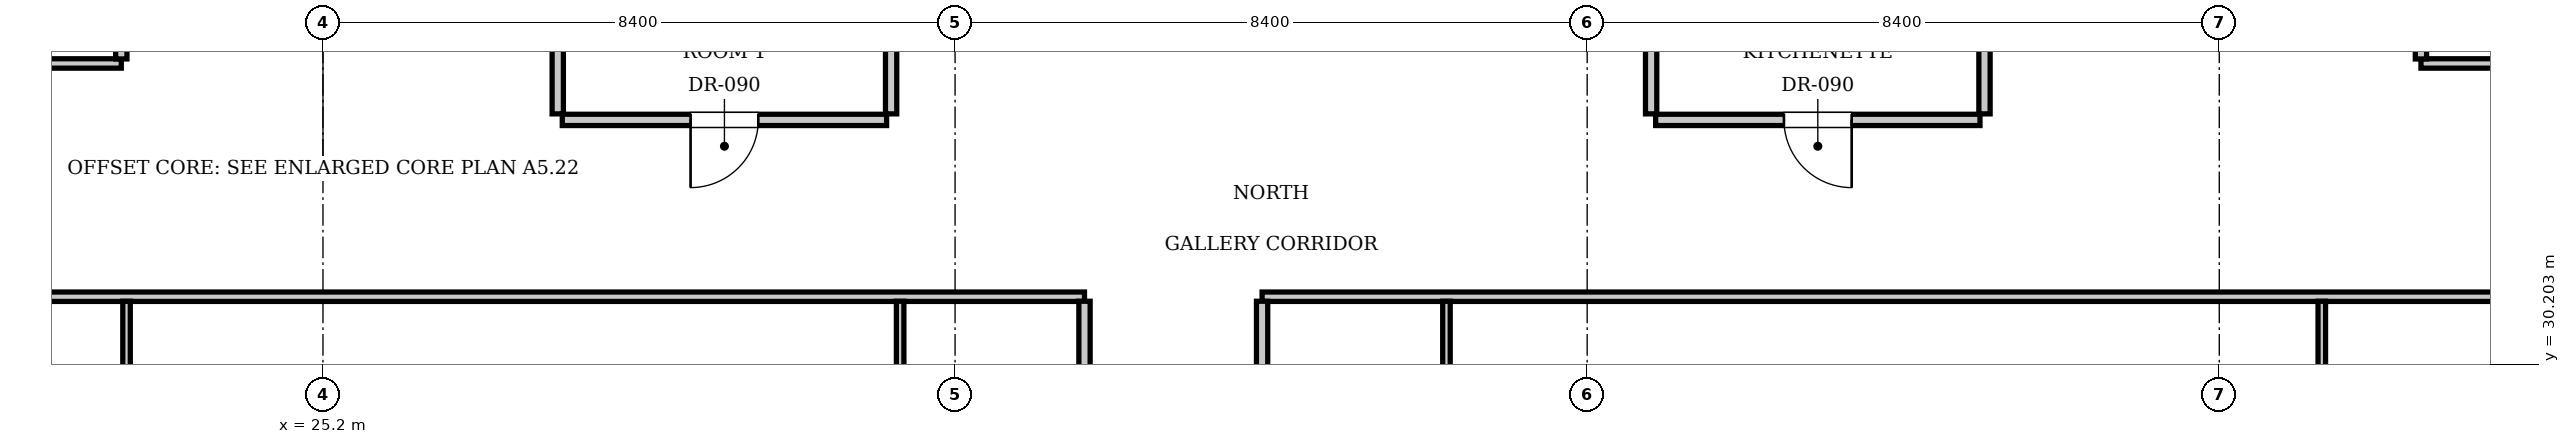
"""IFC4 building model, lengths in metres.
Left out: names, types, materials, properties, quantities, classifications, styles, units other than length and angle.
Written with IfcOpenShell. Run it as: python <this file> out.ifc"""

import sys

from ifc_helpers import new_model, si_unit, direction, frame, frame_2d, origin, place, context, subcontext, project, spatial, rectangle, extrude, element, fill, save


model = new_model("IFC4")
c1 = context("Model", 3, precision=1e-05, world=origin(), true_north=direction((0.0, 1.0)))
c2 = subcontext(c1, "Body", "Model", "MODEL_VIEW")
j1 = project(units=[si_unit("LENGTHUNIT", "METRE"), si_unit("PLANEANGLEUNIT", "RADIAN")], contexts=[c1])
p1 = place(None, origin())
s1 = spatial("IfcSite", under=j1, at=p1, CompositionType="ELEMENT")
p2 = place(p1, origin())
s2 = spatial("IfcBuilding", under=s1, at=p2, CompositionType="ELEMENT")
p3 = place(p2, frame((0.0, 0.0, 146.65)))
s3 = spatial("IfcBuildingStorey", under=s2, at=p3, CompositionType="ELEMENT", Elevation=146.65)
for number, where, z_axis, x_axis in (
    (1, (28.32, 33.53, 0.0), (0.0, 0.0, 1.0), (0.0, 1.0, 0.0)),
    (2, (32.75, 33.53, 0.0), (0.0, 0.0, 1.0), (0.0, 1.0, 0.0)),
):
    element("IfcWall", number, at=place(p3, frame(where, z_axis=z_axis, x_axis=x_axis)), inside=s3, PredefinedType="PARTITIONING", context=c2, shape_type="SweptSolid", body=[
        extrude(rectangle(XDim=2.59, YDim=0.15, at=frame_2d((1.295, 0.0))), origin(), (0.0, 0.0, 1.0), 3.61),
    ])
p4 = place(p3, frame((28.38, 33.45, 0.0), z_axis=(0.0, 0.0, 1.0), x_axis=(1.0, 0.0, 0.0)))
e3 = element("IfcWall", 3, at=p4, inside=s3, PredefinedType="PARTITIONING", context=c2, shape_type="SweptSolid", body=[
    extrude(rectangle(XDim=4.31, YDim=0.15, at=frame_2d((2.155, 0.0))), origin(), (0.0, 0.0, 1.0), 3.61),
])
p5 = place(p4, frame((1.705, 0.0, 0.0)))
e4 = element("IfcOpeningElement", 4, at=p5, cuts=e3, PredefinedType="OPENING", context=c2, shape_type="SweptSolid", body=[
    extrude(rectangle(XDim=0.9, YDim=2.1, at=frame_2d((0.45, 1.05))), frame((0.0, 0.085, 0.0), z_axis=(0.0, -1.0, 0.0), x_axis=(1.0, 0.0, 0.0)), (0.0, 0.0, 1.0), 0.17),
])
for number, where, z_axis, x_axis in (
    (5, (42.85, 33.53, 0.0), (0.0, 0.0, 1.0), (0.0, 1.0, 0.0)),
    (6, (47.28, 33.53, 0.0), (0.0, 0.0, 1.0), (0.0, 1.0, 0.0)),
):
    element("IfcWall", number, at=place(p3, frame(where, z_axis=z_axis, x_axis=x_axis)), inside=s3, PredefinedType="PARTITIONING", context=c2, shape_type="SweptSolid", body=[
        extrude(rectangle(XDim=2.59, YDim=0.15, at=frame_2d((1.295, 0.0))), origin(), (0.0, 0.0, 1.0), 3.61),
    ])
p6 = place(p3, frame((42.91, 33.45, 0.0), z_axis=(0.0, 0.0, 1.0), x_axis=(1.0, 0.0, 0.0)))
e7 = element("IfcWall", 7, at=p6, inside=s3, PredefinedType="PARTITIONING", context=c2, shape_type="SweptSolid", body=[
    extrude(rectangle(XDim=4.31, YDim=0.15, at=frame_2d((2.155, 0.0))), origin(), (0.0, 0.0, 1.0), 3.61),
])
p7 = place(p6, frame((1.705, 0.0, 0.0)))
e8 = element("IfcOpeningElement", 8, at=p7, cuts=e7, PredefinedType="OPENING", context=c2, shape_type="SweptSolid", body=[
    extrude(rectangle(XDim=0.9, YDim=2.1, at=frame_2d((0.45, 1.05))), frame((0.0, 0.085, 0.0), z_axis=(0.0, -1.0, 0.0), x_axis=(1.0, 0.0, 0.0)), (0.0, 0.0, 1.0), 0.17),
])
p8 = place(p3, frame((13.2, 31.1, 0.0), z_axis=(0.0, 0.0, 1.0), x_axis=(1.0, 0.0, 0.0)))
e9 = element("IfcWall", 9, at=p8, inside=s3, PredefinedType="PARTITIONING", context=c2, shape_type="SweptSolid", body=[
    extrude(rectangle(XDim=22.12, YDim=0.125, at=frame_2d((11.06, 0.0))), origin(), (0.0, 0.0, 1.0), 3.61),
])
p9 = place(p3, frame((37.68, 31.1, 0.0), z_axis=(0.0, 0.0, 1.0), x_axis=(1.0, 0.0, 0.0)))
e10 = element("IfcWall", 10, at=p9, inside=s3, PredefinedType="PARTITIONING", context=c2, shape_type="SweptSolid", body=[
    extrude(rectangle(XDim=24.72, YDim=0.125, at=frame_2d((12.36, 0.0))), origin(), (0.0, 0.0, 1.0), 3.61),
])
p10 = place(p3, frame((35.32, 29.15, 0.0), z_axis=(0.0, 0.0, 1.0), x_axis=(0.0, 1.0, 0.0)))
e11 = element("IfcWall", 11, at=p10, inside=s3, PredefinedType="PARTITIONING", context=c2, shape_type="SweptSolid", body=[
    extrude(rectangle(XDim=1.89, YDim=0.15, at=frame_2d((0.945, 0.0))), origin(), (0.0, 0.0, 1.0), 3.61),
])
p11 = place(p3, frame((32.87, 29.15, 0.0), z_axis=(0.0, 0.0, 1.0), x_axis=(0.0, 1.0, 0.0)))
e12 = element("IfcWall", 12, at=p11, inside=s3, PredefinedType="PARTITIONING", context=c2, shape_type="SweptSolid", body=[
    extrude(rectangle(XDim=1.89, YDim=0.1, at=frame_2d((0.945, 0.0))), origin(), (0.0, 0.0, 1.0), 3.61),
])
p12 = place(p3, frame((22.59, 26.43, 0.0), z_axis=(0.0, 0.0, 1.0), x_axis=(0.0, 1.0, 0.0)))
e13 = element("IfcWall", 13, at=p12, inside=s3, PredefinedType="PARTITIONING", context=c2, shape_type="SweptSolid", body=[
    extrude(rectangle(XDim=4.61, YDim=0.1, at=frame_2d((2.305, 0.0))), origin(), (0.0, 0.0, 1.0), 3.61),
])
p13 = place(p12, frame((1.855, 0.0, 0.0)))
e14 = element("IfcOpeningElement", 14, at=p13, cuts=e13, PredefinedType="OPENING", context=c2, shape_type="SweptSolid", body=[
    extrude(rectangle(XDim=0.9, YDim=2.1, at=frame_2d((0.45, 1.05))), frame((0.0, 0.06, 0.0), z_axis=(0.0, -1.0, 0.0), x_axis=(1.0, 0.0, 0.0)), (0.0, 0.0, 1.0), 0.12),
])
p14 = place(p3, frame((37.68, 29.15, 0.0), z_axis=(0.0, 0.0, 1.0), x_axis=(0.0, 1.0, 0.0)))
e15 = element("IfcWall", 15, at=p14, inside=s3, PredefinedType="PARTITIONING", context=c2, shape_type="SweptSolid", body=[
    extrude(rectangle(XDim=1.89, YDim=0.15, at=frame_2d((0.945, 0.0))), origin(), (0.0, 0.0, 1.0), 3.61),
])
p15 = place(p3, frame((40.13, 29.15, 0.0), z_axis=(0.0, 0.0, 1.0), x_axis=(0.0, 1.0, 0.0)))
e16 = element("IfcWall", 16, at=p15, inside=s3, PredefinedType="PARTITIONING", context=c2, shape_type="SweptSolid", body=[
    extrude(rectangle(XDim=1.89, YDim=0.1, at=frame_2d((0.945, 0.0))), origin(), (0.0, 0.0, 1.0), 3.61),
])
p16 = place(p3, frame((51.762, 26.43, 0.0), z_axis=(0.0, 0.0, 1.0), x_axis=(0.0, 1.0, 0.0)))
e17 = element("IfcWall", 17, at=p16, inside=s3, PredefinedType="PARTITIONING", context=c2, shape_type="SweptSolid", body=[
    extrude(rectangle(XDim=4.61, YDim=0.1, at=frame_2d((2.305, 0.0))), origin(), (0.0, 0.0, 1.0), 3.61),
])
p17 = place(p16, frame((1.855, 0.0, 0.0)))
e18 = element("IfcOpeningElement", 18, at=p17, cuts=e17, PredefinedType="OPENING", context=c2, shape_type="SweptSolid", body=[
    extrude(rectangle(XDim=0.9, YDim=2.1, at=frame_2d((0.45, 1.05))), frame((0.0, 0.06, 0.0), z_axis=(0.0, -1.0, 0.0), x_axis=(1.0, 0.0, 0.0)), (0.0, 0.0, 1.0), 0.12),
])
p18 = place(p3, frame((13.2, 34.2, 0.0), z_axis=(0.0, 0.0, 1.0), x_axis=(1.0, 0.0, 0.0)))
e19 = element("IfcWall", 19, at=p18, inside=s3, PredefinedType="PARTITIONING", context=c2, shape_type="SweptSolid", body=[
    extrude(rectangle(XDim=9.32, YDim=0.125, at=frame_2d((4.66, 0.0))), origin(), (0.0, 0.0, 1.0), 3.61),
])
p19 = place(p3, frame((53.08, 34.2, 0.0), z_axis=(0.0, 0.0, 1.0), x_axis=(1.0, 0.0, 0.0)))
e20 = element("IfcWall", 20, at=p19, inside=s3, PredefinedType="PARTITIONING", context=c2, shape_type="SweptSolid", body=[
    extrude(rectangle(XDim=9.32, YDim=0.125, at=frame_2d((4.66, 0.0))), origin(), (0.0, 0.0, 1.0), 3.61),
])
for number, where, z_axis, x_axis in (
    (21, (22.52, 34.26, 0.0), (0.0, 0.0, 1.0), (0.0, 1.0, 0.0)),
    (22, (53.08, 34.26, 0.0), (0.0, 0.0, 1.0), (0.0, 1.0, 0.0)),
):
    element("IfcWall", number, at=place(p3, frame(where, z_axis=z_axis, x_axis=x_axis)), inside=s3, PredefinedType="PARTITIONING", context=c2, shape_type="SweptSolid", body=[
        extrude(rectangle(XDim=2.29, YDim=0.15, at=frame_2d((1.145, 0.0))), origin(), (0.0, 0.0, 1.0), 3.61),
    ])
p20 = place(p5, frame((0.9, 0.0, 0.0), z_axis=(0.0, 0.0, 1.0), x_axis=(-1.0, 0.0, 0.0)))
e23 = element("IfcDoor", 23, at=p20, inside=s3, OperationType="SINGLE_SWING_RIGHT", PredefinedType="DOOR", context=c2, shape_type="SweptSolid", body=[
    extrude(rectangle(XDim=0.9, YDim=2.1, at=frame_2d((0.45, 1.05))), frame((0.0, 0.025, 0.0), z_axis=(0.0, -1.0, 0.0), x_axis=(1.0, 0.0, 0.0)), (0.0, 0.0, 1.0), 0.05),
])
fill(e4, e23)
p21 = place(p7, frame((0.9, 0.0, 0.0), z_axis=(0.0, 0.0, 1.0), x_axis=(-1.0, 0.0, 0.0)))
e24 = element("IfcDoor", 24, at=p21, inside=s3, OperationType="SINGLE_SWING_LEFT", PredefinedType="DOOR", context=c2, shape_type="SweptSolid", body=[
    extrude(rectangle(XDim=0.9, YDim=2.1, at=frame_2d((0.45, 1.05))), frame((0.0, 0.025, 0.0), z_axis=(0.0, -1.0, 0.0), x_axis=(1.0, 0.0, 0.0)), (0.0, 0.0, 1.0), 0.05),
])
fill(e8, e24)
save(model, sys.argv[1])
